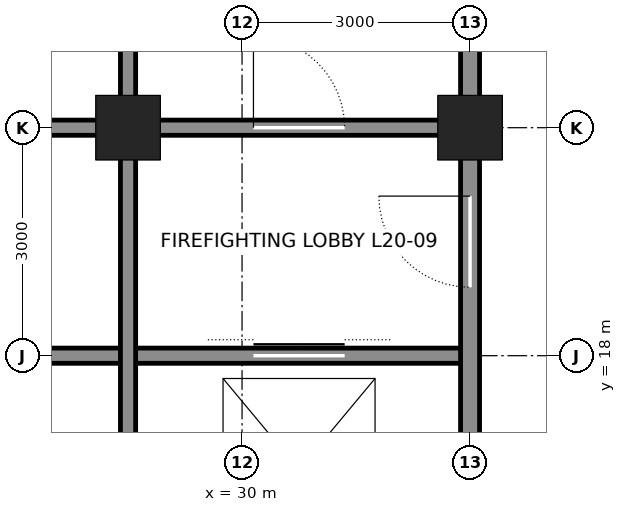
"""IFC4 building model, lengths in metres.
Left out: names, types, materials, properties, quantities, classifications, styles, units other than length and angle.
Written with IfcOpenShell. Run it as: python <this file> out.ifc"""

import sys

from ifc_helpers import new_model, si_unit, direction, frame, frame_2d, origin, origin_2d, place, context, subcontext, project, spatial, rectangle, hollow_rectangle, extrude, element, fill, save


model = new_model("IFC4")
c1 = context("Model", 3, precision=1e-05, world=origin(), true_north=direction((0.0, 1.0)))
c2 = subcontext(c1, "Body", "Model", "MODEL_VIEW")
j1 = project(units=[si_unit("LENGTHUNIT", "METRE"), si_unit("PLANEANGLEUNIT", "RADIAN")], contexts=[c1])
p1 = place(None, origin())
s1 = spatial("IfcSite", under=j1, at=p1, CompositionType="ELEMENT")
p2 = place(p1, origin())
s2 = spatial("IfcBuilding", under=s1, at=p2, CompositionType="ELEMENT")
p3 = place(p2, frame((0.0, 0.0, 96.3)))
s3 = spatial("IfcBuildingStorey", under=s2, at=p3, CompositionType="ELEMENT", Elevation=96.3)
for number, where, z_axis, x_axis in (
    (1, (33.0, 21.0, 0.0), (0.0, 0.0, 1.0), (1.0, 0.0, 0.0)),
    (2, (28.5, 21.0, 0.0), (0.0, 0.0, 1.0), (1.0, 0.0, 0.0)),
):
    element("IfcColumn", number, at=place(p3, frame(where, z_axis=z_axis, x_axis=x_axis)), inside=s3, PredefinedType="COLUMN", context=c2, shape_type="SweptSolid", body=[
        extrude(hollow_rectangle(XDim=0.85, YDim=0.85, WallThickness=0.085, at=origin_2d()), origin(), (0.0, 0.0, 1.0), 6.0),
    ])
p4 = place(p3, frame((25.5, 18.0, 0.0), z_axis=(0.0, 0.0, 1.0), x_axis=(1.0, 0.0, 0.0)))
e3 = element("IfcWall", 3, at=p4, inside=s3, PredefinedType="SOLIDWALL", context=c2, shape_type="SweptSolid", body=[
    extrude(rectangle(XDim=7.5, YDim=0.2, at=frame_2d((3.75, 0.0))), origin(), (0.0, 0.0, 1.0), 5.84),
])
p5 = place(p4, frame((4.65, 0.0, 0.0)))
e4 = element("IfcOpeningElement", 4, at=p5, cuts=e3, PredefinedType="OPENING", context=c2, shape_type="SweptSolid", body=[
    extrude(rectangle(XDim=1.2, YDim=2.1, at=frame_2d((0.6, 1.05))), frame((0.0, 0.11, 0.0), z_axis=(0.0, -1.0, 0.0), x_axis=(1.0, 0.0, 0.0)), (0.0, 0.0, 1.0), 0.22),
])
p6 = place(p3, frame((25.5, 21.0, 0.0), z_axis=(0.0, 0.0, 1.0), x_axis=(1.0, 0.0, 0.0)))
e5 = element("IfcWall", 5, at=p6, inside=s3, PredefinedType="SOLIDWALL", context=c2, shape_type="SweptSolid", body=[
    extrude(rectangle(XDim=2.75, YDim=0.2, at=frame_2d((1.375, 0.0))), origin(), (0.0, 0.0, 1.0), 4.89),
])
p7 = place(p3, frame((28.75, 21.0, 0.0), z_axis=(0.0, 0.0, 1.0), x_axis=(1.0, 0.0, 0.0)))
e6 = element("IfcWall", 6, at=p7, inside=s3, PredefinedType="SOLIDWALL", context=c2, shape_type="SweptSolid", body=[
    extrude(rectangle(XDim=4.0, YDim=0.2, at=frame_2d((2.0, 0.0))), origin(), (0.0, 0.0, 1.0), 4.89),
])
p8 = place(p7, frame((1.4, 0.0, 0.0)))
e7 = element("IfcOpeningElement", 7, at=p8, cuts=e6, PredefinedType="OPENING", context=c2, shape_type="SweptSolid", body=[
    extrude(rectangle(XDim=1.2, YDim=2.1, at=frame_2d((0.6, 1.05))), frame((0.0, 0.11, 0.0), z_axis=(0.0, -1.0, 0.0), x_axis=(1.0, 0.0, 0.0)), (0.0, 0.0, 1.0), 0.22),
])
p9 = place(p3, frame((28.5, 12.25, 0.0), z_axis=(0.0, 0.0, 1.0), x_axis=(0.0, 1.0, 0.0)))
e8 = element("IfcWall", 8, at=p9, inside=s3, PredefinedType="SOLIDWALL", context=c2, shape_type="SweptSolid", body=[
    extrude(rectangle(XDim=8.5, YDim=0.2, at=frame_2d((4.25, 0.0))), origin(), (0.0, 0.0, 1.0), 4.913),
])
p10 = place(p3, frame((28.5, 21.25, 0.0), z_axis=(0.0, 0.0, 1.0), x_axis=(0.0, 1.0, 0.0)))
e9 = element("IfcWall", 9, at=p10, inside=s3, PredefinedType="SOLIDWALL", context=c2, shape_type="SweptSolid", body=[
    extrude(rectangle(XDim=2.5, YDim=0.2, at=frame_2d((1.25, 0.0))), origin(), (0.0, 0.0, 1.0), 4.913),
])
p11 = place(p3, frame((33.0, 12.25, 0.0), z_axis=(0.0, 0.0, 1.0), x_axis=(0.0, 1.0, 0.0)))
e10 = element("IfcWall", 10, at=p11, inside=s3, PredefinedType="SOLIDWALL", context=c2, shape_type="SweptSolid", body=[
    extrude(rectangle(XDim=8.5, YDim=0.25, at=frame_2d((4.25, 0.0))), origin(), (0.0, 0.0, 1.0), 4.913),
])
p12 = place(p11, frame((6.65, 0.0, 0.0)))
e11 = element("IfcOpeningElement", 11, at=p12, cuts=e10, PredefinedType="OPENING", context=c2, shape_type="SweptSolid", body=[
    extrude(rectangle(XDim=1.2, YDim=2.1, at=frame_2d((0.6, 1.05))), frame((0.0, 0.135, 0.0), z_axis=(0.0, -1.0, 0.0), x_axis=(1.0, 0.0, 0.0)), (0.0, 0.0, 1.0), 0.27),
])
p13 = place(p11, frame((0.875, 0.0, 0.0)))
e12 = element("IfcOpeningElement", 12, at=p13, cuts=e10, PredefinedType="OPENING", context=c2, shape_type="SweptSolid", body=[
    extrude(rectangle(XDim=0.75, YDim=2.1, at=frame_2d((0.375, 1.05))), frame((0.0, 0.135, 0.0), z_axis=(0.0, -1.0, 0.0), x_axis=(1.0, 0.0, 0.0)), (0.0, 0.0, 1.0), 0.27),
])
p14 = place(p3, frame((33.0, 21.25, 0.0), z_axis=(0.0, 0.0, 1.0), x_axis=(0.0, 1.0, 0.0)))
e13 = element("IfcWall", 13, at=p14, inside=s3, PredefinedType="SOLIDWALL", context=c2, shape_type="SweptSolid", body=[
    extrude(rectangle(XDim=2.5, YDim=0.25, at=frame_2d((1.25, 0.0))), origin(), (0.0, 0.0, 1.0), 4.913),
])
p15 = place(p8, origin())
e14 = element("IfcDoor", 14, at=p15, inside=s3, OperationType="SINGLE_SWING_LEFT", PredefinedType="DOOR", context=c2, shape_type="SweptSolid", body=[
    extrude(rectangle(XDim=1.2, YDim=2.1, at=frame_2d((0.6, 1.05))), frame((0.0, 0.025, 0.0), z_axis=(0.0, -1.0, 0.0), x_axis=(1.0, 0.0, 0.0)), (0.0, 0.0, 1.0), 0.05),
])
fill(e7, e14)
p16 = place(p12, origin())
e15 = element("IfcDoor", 15, at=p16, inside=s3, OperationType="SINGLE_SWING_RIGHT", PredefinedType="DOOR", context=c2, shape_type="SweptSolid", body=[
    extrude(rectangle(XDim=1.2, YDim=2.1, at=frame_2d((0.6, 1.05))), frame((0.0, 0.025, 0.0), z_axis=(0.0, -1.0, 0.0), x_axis=(1.0, 0.0, 0.0)), (0.0, 0.0, 1.0), 0.05),
])
fill(e11, e15)
p17 = place(p5, origin())
e16 = element("IfcDoor", 16, at=p17, inside=s3, OperationType="DOUBLE_DOOR_SLIDING", PredefinedType="DOOR", context=c2, shape_type="SweptSolid", body=[
    extrude(rectangle(XDim=1.2, YDim=2.1, at=frame_2d((0.6, 1.05))), frame((0.0, 0.025, 0.0), z_axis=(0.0, -1.0, 0.0), x_axis=(1.0, 0.0, 0.0)), (0.0, 0.0, 1.0), 0.05),
])
fill(e4, e16)
save(model, sys.argv[1])
